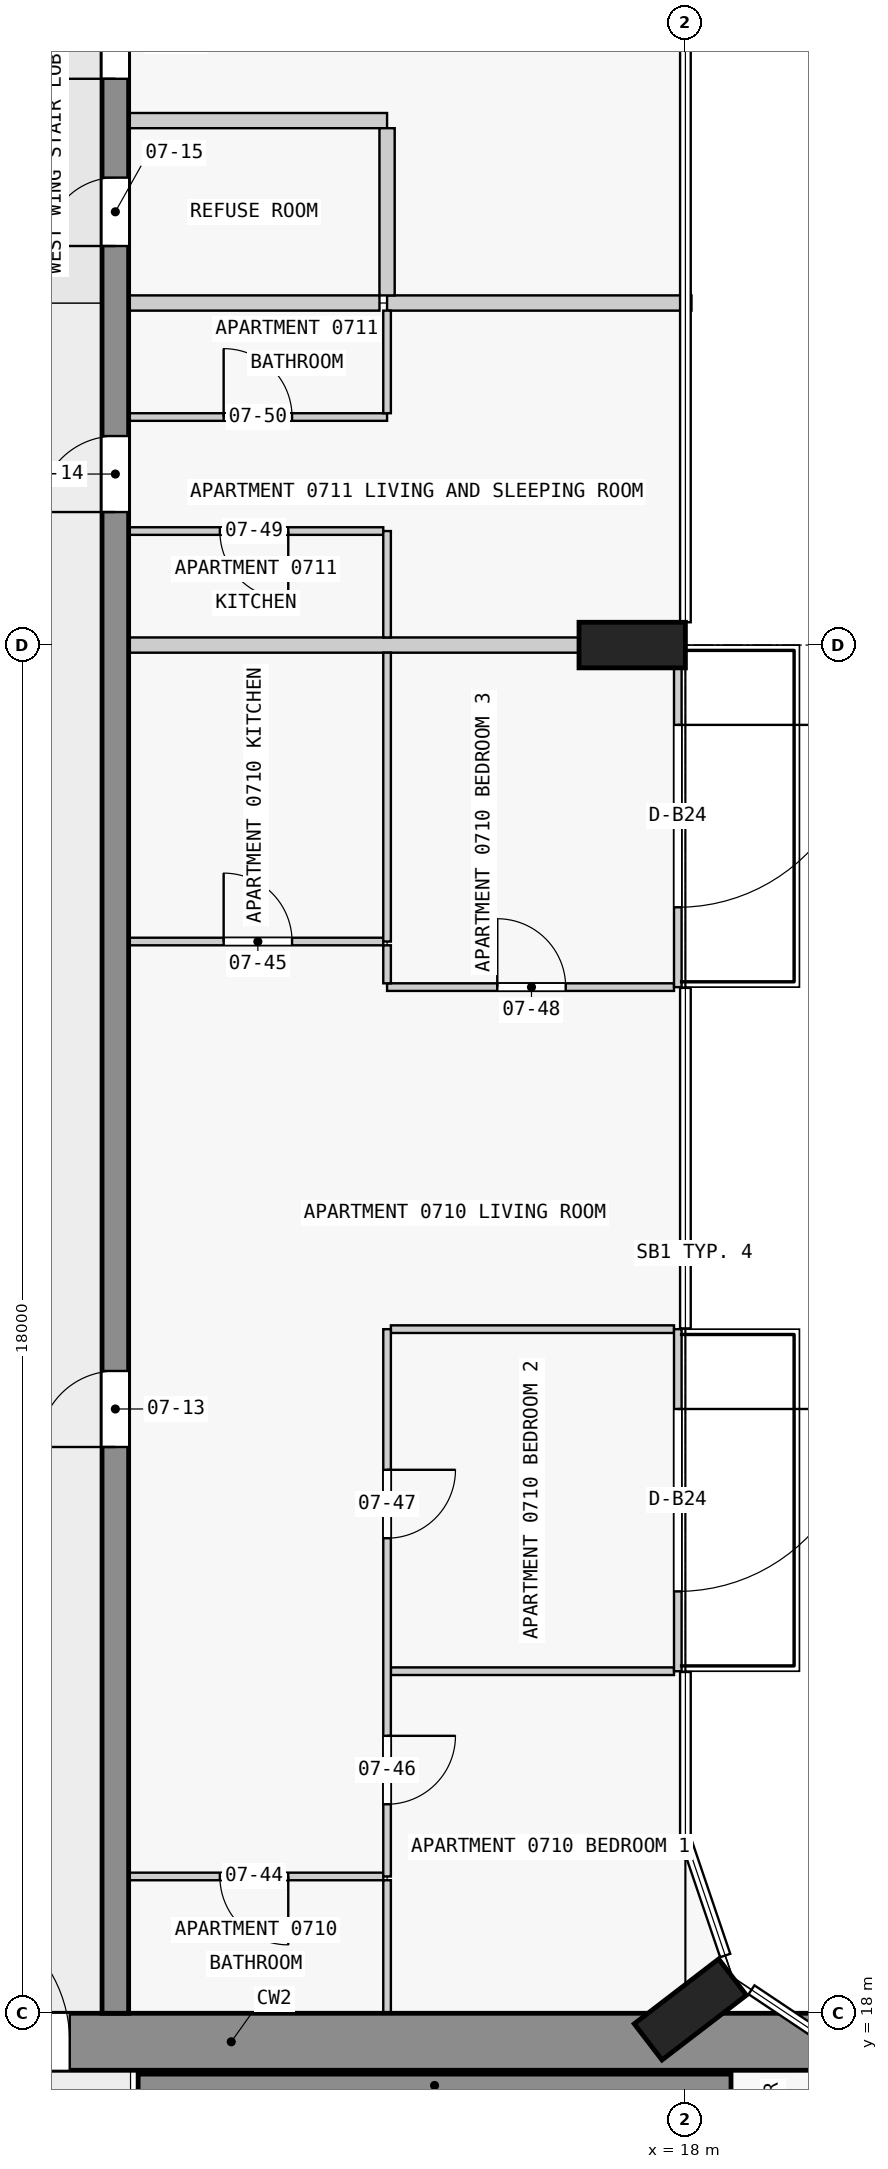
"""IFC4 building model, lengths in metres.
Left out: names, types, materials, properties, quantities, classifications, styles, units other than length and angle.
Written with IfcOpenShell. Run it as: python <this file> out.ifc"""

import sys

from ifc_helpers import new_model, si_unit, direction, frame, frame_2d, origin, origin_2d, place, context, subcontext, project, spatial, rectangle, extrude, element, fill, save


model = new_model("IFC4")
c1 = context("Model", 3, precision=1e-05, world=origin(), true_north=direction((0.0, 1.0)))
c2 = subcontext(c1, "Body", "Model", "MODEL_VIEW")
j1 = project(units=[si_unit("LENGTHUNIT", "METRE"), si_unit("PLANEANGLEUNIT", "RADIAN")], contexts=[c1])
p1 = place(None, origin())
s1 = spatial("IfcSite", under=j1, at=p1, CompositionType="ELEMENT")
p2 = place(p1, origin())
s2 = spatial("IfcBuilding", under=s1, at=p2, CompositionType="ELEMENT")
p3 = place(p2, frame((0.0, 0.0, 33.8)))
s3 = spatial("IfcBuildingStorey", under=s2, at=p3, CompositionType="ELEMENT", Elevation=33.8)
for number, where, z_axis, x_axis in (
    (1, (18.065, 18.05, 0.0), (0.0, 0.0, 1.0), (-0.609, 0.793, 0.0)),
    (2, (17.3, 36.0, 0.0), (0.0, 0.0, 1.0), (0.0, 1.0, 0.0)),
):
    element("IfcColumn", number, at=place(p3, frame(where, z_axis=z_axis, x_axis=x_axis)), inside=s3, PredefinedType="COLUMN", context=c2, shape_type="SweptSolid", body=[
        extrude(rectangle(XDim=0.6, YDim=1.4, at=origin_2d()), origin(), (0.0, 0.0, 1.0), 3.5),
    ])
p4 = place(p3, frame((1.55, 17.625, 0.0), z_axis=(0.0, 0.0, 1.0), x_axis=(1.0, 0.0, 0.0)))
e3 = element("IfcWall", 3, at=p4, inside=s3, PredefinedType="SHEAR", context=c2, shape_type="SweptSolid", body=[
    extrude(rectangle(XDim=20.95, YDim=0.75, at=frame_2d((10.475, 0.0))), origin(), (0.0, 0.0, 1.0), 3.25),
])
p5 = place(p4, frame((6.55, 0.0, 0.0)))
e4 = element("IfcOpeningElement", 4, at=p5, cuts=e3, PredefinedType="OPENING", context=c2, shape_type="SweptSolid", body=[
    extrude(rectangle(XDim=1.8, YDim=2.1, at=frame_2d((0.9, 1.05))), frame((0.0, 0.385, 0.0), z_axis=(0.0, -1.0, 0.0), x_axis=(1.0, 0.0, 0.0)), (0.0, 0.0, 1.0), 0.77),
])
p6 = place(p3, frame((10.8, 17.05, 0.0), z_axis=(0.0, 0.0, 1.0), x_axis=(1.0, 0.0, 0.0)))
e5 = element("IfcWall", 5, at=p6, inside=s3, PredefinedType="SHEAR", context=c2, shape_type="SweptSolid", body=[
    extrude(rectangle(XDim=7.8, YDim=0.3, at=frame_2d((3.9, 0.0))), origin(), (0.0, 0.0, 1.0), 3.25),
])
p7 = place(p3, frame((10.5, 18.0, 0.0), z_axis=(0.0, 0.0, 1.0), x_axis=(0.0, 1.0, 0.0)))
e6 = element("IfcWall", 6, at=p7, inside=s3, PredefinedType="SHEAR", context=c2, shape_type="SweptSolid", body=[
    extrude(rectangle(XDim=27.0, YDim=0.35, at=frame_2d((13.5, 0.0))), origin(), (0.0, 0.0, 1.0), 3.25),
])
p8 = place(p7, frame((7.45, 0.0, 0.0)))
e7 = element("IfcOpeningElement", 7, at=p8, cuts=e6, PredefinedType="OPENING", context=c2, shape_type="SweptSolid", body=[
    extrude(rectangle(XDim=1.0, YDim=2.1, at=frame_2d((0.5, 1.05))), frame((0.0, 0.185, 0.0), z_axis=(0.0, -1.0, 0.0), x_axis=(1.0, 0.0, 0.0)), (0.0, 0.0, 1.0), 0.37),
])
p9 = place(p7, frame((19.75, 0.0, 0.0)))
e8 = element("IfcOpeningElement", 8, at=p9, cuts=e6, PredefinedType="OPENING", context=c2, shape_type="SweptSolid", body=[
    extrude(rectangle(XDim=1.0, YDim=2.1, at=frame_2d((0.5, 1.05))), frame((0.0, 0.185, 0.0), z_axis=(0.0, -1.0, 0.0), x_axis=(1.0, 0.0, 0.0)), (0.0, 0.0, 1.0), 0.37),
])
p10 = place(p7, frame((23.25, 0.0, 0.0)))
e9 = element("IfcOpeningElement", 9, at=p10, cuts=e6, PredefinedType="OPENING", context=c2, shape_type="SweptSolid", body=[
    extrude(rectangle(XDim=0.9, YDim=2.1, at=frame_2d((0.45, 1.05))), frame((0.0, 0.185, 0.0), z_axis=(0.0, -1.0, 0.0), x_axis=(1.0, 0.0, 0.0)), (0.0, 0.0, 1.0), 0.37),
])
p11 = place(p7, frame((25.45, 0.0, 0.0)))
e10 = element("IfcOpeningElement", 10, at=p11, cuts=e6, PredefinedType="OPENING", context=c2, shape_type="SweptSolid", body=[
    extrude(rectangle(XDim=1.0, YDim=2.1, at=frame_2d((0.5, 1.05))), frame((0.0, 0.185, 0.0), z_axis=(0.0, -1.0, 0.0), x_axis=(1.0, 0.0, 0.0)), (0.0, 0.0, 1.0), 0.37),
])
p12 = place(p3, frame((17.9, 27.0, 0.0), z_axis=(0.0, 0.0, 1.0), x_axis=(0.0, -1.0, 0.0)))
e11 = element("IfcWall", 11, at=p12, inside=s3, PredefinedType="STANDARD", context=c2, shape_type="SweptSolid", body=[
    extrude(rectangle(XDim=4.5, YDim=0.1, at=frame_2d((2.25, 0.0))), origin(), (0.0, 0.0, 1.0), 3.25),
])
p13 = place(p12, frame((1.05, 0.0, 0.0)))
e12 = element("IfcOpeningElement", 12, at=p13, cuts=e11, PredefinedType="OPENING", context=c2, shape_type="SweptSolid", body=[
    extrude(rectangle(XDim=2.4, YDim=2.4, at=frame_2d((1.2, 1.2))), frame((0.0, 0.06, 0.0), z_axis=(0.0, -1.0, 0.0), x_axis=(1.0, 0.0, 0.0)), (0.0, 0.0, 1.0), 0.12),
])
p14 = place(p3, frame((17.9, 36.0, 0.0), z_axis=(0.0, 0.0, 1.0), x_axis=(0.0, -1.0, 0.0)))
e13 = element("IfcWall", 13, at=p14, inside=s3, PredefinedType="STANDARD", context=c2, shape_type="SweptSolid", body=[
    extrude(rectangle(XDim=4.5, YDim=0.1, at=frame_2d((2.25, 0.0))), origin(), (0.0, 0.0, 1.0), 3.25),
])
p15 = place(p14, frame((1.05, 0.0, 0.0)))
e14 = element("IfcOpeningElement", 14, at=p15, cuts=e13, PredefinedType="OPENING", context=c2, shape_type="SweptSolid", body=[
    extrude(rectangle(XDim=2.4, YDim=2.4, at=frame_2d((1.2, 1.2))), frame((0.0, 0.06, 0.0), z_axis=(0.0, -1.0, 0.0), x_axis=(1.0, 0.0, 0.0)), (0.0, 0.0, 1.0), 0.12),
])
p16 = place(p3, frame((14.025, 19.8, 0.0), z_axis=(0.0, 0.0, 1.0), x_axis=(-1.0, 0.0, 0.0)))
e15 = element("IfcWall", 15, at=p16, inside=s3, PredefinedType="PARTITIONING", context=c2, shape_type="SweptSolid", body=[
    extrude(rectangle(XDim=3.35, YDim=0.1, at=frame_2d((1.675, 0.0))), origin(), (0.0, 0.0, 1.0), 3.25),
])
p17 = place(p16, frame((1.25, 0.0, 0.0)))
e16 = element("IfcOpeningElement", 16, at=p17, cuts=e15, PredefinedType="OPENING", context=c2, shape_type="SweptSolid", body=[
    extrude(rectangle(XDim=0.9, YDim=2.1, at=frame_2d((0.45, 1.05))), frame((0.0, 0.06, 0.0), z_axis=(0.0, -1.0, 0.0), x_axis=(1.0, 0.0, 0.0)), (0.0, 0.0, 1.0), 0.12),
])
for number, where, z_axis, x_axis in (
    (17, (17.85, 22.5, 0.0), (0.0, 0.0, 1.0), (-1.0, 0.0, 0.0)),
    (18, (17.85, 27.0, 0.0), (0.0, 0.0, 1.0), (-1.0, 0.0, 0.0)),
):
    element("IfcWall", number, at=place(p3, frame(where, z_axis=z_axis, x_axis=x_axis)), inside=s3, PredefinedType="PARTITIONING", context=c2, shape_type="SweptSolid", body=[
        extrude(rectangle(XDim=3.725, YDim=0.1, at=frame_2d((1.863, 0.0))), origin(), (0.0, 0.0, 1.0), 3.25),
    ])
p18 = place(p3, frame((14.075, 31.5, 0.0), z_axis=(0.0, 0.0, 1.0), x_axis=(1.0, 0.0, 0.0)))
e19 = element("IfcWall", 19, at=p18, inside=s3, PredefinedType="PARTITIONING", context=c2, shape_type="SweptSolid", body=[
    extrude(rectangle(XDim=3.775, YDim=0.1, at=frame_2d((1.888, 0.0))), origin(), (0.0, 0.0, 1.0), 3.25),
])
p19 = place(p18, frame((1.45, 0.0, 0.0)))
e20 = element("IfcOpeningElement", 20, at=p19, cuts=e19, PredefinedType="OPENING", context=c2, shape_type="SweptSolid", body=[
    extrude(rectangle(XDim=0.9, YDim=2.1, at=frame_2d((0.45, 1.05))), frame((0.0, 0.06, 0.0), z_axis=(0.0, -1.0, 0.0), x_axis=(1.0, 0.0, 0.0)), (0.0, 0.0, 1.0), 0.12),
])
p20 = place(p3, frame((10.675, 32.1, 0.0), z_axis=(0.0, 0.0, 1.0), x_axis=(1.0, 0.0, 0.0)))
e21 = element("IfcWall", 21, at=p20, inside=s3, PredefinedType="PARTITIONING", context=c2, shape_type="SweptSolid", body=[
    extrude(rectangle(XDim=3.35, YDim=0.1, at=frame_2d((1.675, 0.0))), origin(), (0.0, 0.0, 1.0), 3.25),
])
p21 = place(p20, frame((1.25, 0.0, 0.0)))
e22 = element("IfcOpeningElement", 22, at=p21, cuts=e21, PredefinedType="OPENING", context=c2, shape_type="SweptSolid", body=[
    extrude(rectangle(XDim=0.9, YDim=2.1, at=frame_2d((0.45, 1.05))), frame((0.0, 0.06, 0.0), z_axis=(0.0, -1.0, 0.0), x_axis=(1.0, 0.0, 0.0)), (0.0, 0.0, 1.0), 0.12),
])
p22 = place(p3, frame((16.6, 36.0, 0.0), z_axis=(0.0, 0.0, 1.0), x_axis=(-1.0, 0.0, 0.0)))
e23 = element("IfcWall", 23, at=p22, inside=s3, PredefinedType="PARTITIONING", context=c2, shape_type="SweptSolid", body=[
    extrude(rectangle(XDim=5.925, YDim=0.2, at=frame_2d((2.962, 0.0))), origin(), (0.0, 0.0, 1.0), 3.25),
])
p23 = place(p3, frame((14.025, 37.5, 0.0), z_axis=(0.0, 0.0, 1.0), x_axis=(-1.0, 0.0, 0.0)))
e24 = element("IfcWall", 24, at=p23, inside=s3, PredefinedType="PARTITIONING", context=c2, shape_type="SweptSolid", body=[
    extrude(rectangle(XDim=3.35, YDim=0.1, at=frame_2d((1.675, 0.0))), origin(), (0.0, 0.0, 1.0), 3.25),
])
p24 = place(p23, frame((1.25, 0.0, 0.0)))
e25 = element("IfcOpeningElement", 25, at=p24, cuts=e24, PredefinedType="OPENING", context=c2, shape_type="SweptSolid", body=[
    extrude(rectangle(XDim=0.9, YDim=2.1, at=frame_2d((0.45, 1.05))), frame((0.0, 0.06, 0.0), z_axis=(0.0, -1.0, 0.0), x_axis=(1.0, 0.0, 0.0)), (0.0, 0.0, 1.0), 0.12),
])
p25 = place(p3, frame((10.675, 39.0, 0.0), z_axis=(0.0, 0.0, 1.0), x_axis=(1.0, 0.0, 0.0)))
e26 = element("IfcWall", 26, at=p25, inside=s3, PredefinedType="PARTITIONING", context=c2, shape_type="SweptSolid", body=[
    extrude(rectangle(XDim=3.4, YDim=0.1, at=frame_2d((1.7, 0.0))), origin(), (0.0, 0.0, 1.0), 3.25),
])
p26 = place(p25, frame((1.25, 0.0, 0.0)))
e27 = element("IfcOpeningElement", 27, at=p26, cuts=e26, PredefinedType="OPENING", context=c2, shape_type="SweptSolid", body=[
    extrude(rectangle(XDim=0.9, YDim=2.1, at=frame_2d((0.45, 1.05))), frame((0.0, 0.06, 0.0), z_axis=(0.0, -1.0, 0.0), x_axis=(1.0, 0.0, 0.0)), (0.0, 0.0, 1.0), 0.12),
])
p27 = place(p3, frame((13.975, 40.5, 0.0), z_axis=(0.0, 0.0, 1.0), x_axis=(-1.0, 0.0, 0.0)))
e28 = element("IfcWall", 28, at=p27, inside=s3, PredefinedType="PARTITIONING", context=c2, shape_type="SweptSolid", body=[
    extrude(rectangle(XDim=3.3, YDim=0.2, at=frame_2d((1.65, 0.0))), origin(), (0.0, 0.0, 1.0), 3.25),
])
p28 = place(p3, frame((14.075, 40.5, 0.0), z_axis=(0.0, 0.0, 1.0), x_axis=(1.0, 0.0, 0.0)))
e29 = element("IfcWall", 29, at=p28, inside=s3, PredefinedType="PARTITIONING", context=c2, shape_type="SweptSolid", body=[
    extrude(rectangle(XDim=4.005, YDim=0.2, at=frame_2d((2.002, 0.0))), origin(), (0.0, 0.0, 1.0), 3.25),
])
p29 = place(p3, frame((14.075, 42.9, 0.0), z_axis=(0.0, 0.0, 1.0), x_axis=(-1.0, 0.0, 0.0)))
e30 = element("IfcWall", 30, at=p29, inside=s3, PredefinedType="PARTITIONING", context=c2, shape_type="SweptSolid", body=[
    extrude(rectangle(XDim=3.4, YDim=0.2, at=frame_2d((1.7, 0.0))), origin(), (0.0, 0.0, 1.0), 3.25),
])
p30 = place(p3, frame((14.075, 27.0, 0.0), z_axis=(0.0, 0.0, 1.0), x_axis=(0.0, -1.0, 0.0)))
e31 = element("IfcWall", 31, at=p30, inside=s3, PredefinedType="PARTITIONING", context=c2, shape_type="SweptSolid", body=[
    extrude(rectangle(XDim=7.2, YDim=0.1, at=frame_2d((3.6, 0.0))), origin(), (0.0, 0.0, 1.0), 3.25),
])
p31 = place(p30, frame((5.35, 0.0, 0.0)))
e32 = element("IfcOpeningElement", 32, at=p31, cuts=e31, PredefinedType="OPENING", context=c2, shape_type="SweptSolid", body=[
    extrude(rectangle(XDim=0.9, YDim=2.1, at=frame_2d((0.45, 1.05))), frame((0.0, 0.06, 0.0), z_axis=(0.0, -1.0, 0.0), x_axis=(1.0, 0.0, 0.0)), (0.0, 0.0, 1.0), 0.12),
])
p32 = place(p30, frame((1.85, 0.0, 0.0)))
e33 = element("IfcOpeningElement", 33, at=p32, cuts=e31, PredefinedType="OPENING", context=c2, shape_type="SweptSolid", body=[
    extrude(rectangle(XDim=0.9, YDim=2.1, at=frame_2d((0.45, 1.05))), frame((0.0, 0.06, 0.0), z_axis=(0.0, -1.0, 0.0), x_axis=(1.0, 0.0, 0.0)), (0.0, 0.0, 1.0), 0.12),
])
p33 = place(p3, frame((14.075, 32.05, 0.0), z_axis=(0.0, 0.0, 1.0), x_axis=(0.0, -1.0, 0.0)))
e34 = element("IfcWall", 34, at=p33, inside=s3, PredefinedType="PARTITIONING", context=c2, shape_type="SweptSolid", body=[
    extrude(rectangle(XDim=0.5, YDim=0.1, at=frame_2d((0.25, 0.0))), origin(), (0.0, 0.0, 1.0), 3.25),
])
p34 = place(p3, frame((14.075, 18.0, 0.0), z_axis=(0.0, 0.0, 1.0), x_axis=(0.0, 1.0, 0.0)))
e35 = element("IfcWall", 35, at=p34, inside=s3, PredefinedType="PARTITIONING", context=c2, shape_type="SweptSolid", body=[
    extrude(rectangle(XDim=1.75, YDim=0.1, at=frame_2d((0.875, 0.0))), origin(), (0.0, 0.0, 1.0), 3.25),
])
p35 = place(p3, frame((14.075, 32.1, 0.0), z_axis=(0.0, 0.0, 1.0), x_axis=(0.0, 1.0, 0.0)))
e36 = element("IfcWall", 36, at=p35, inside=s3, PredefinedType="PARTITIONING", context=c2, shape_type="SweptSolid", body=[
    extrude(rectangle(XDim=3.8, YDim=0.1, at=frame_2d((1.9, 0.0))), origin(), (0.0, 0.0, 1.0), 3.25),
])
p36 = place(p3, frame((14.075, 36.1, 0.0), z_axis=(0.0, 0.0, 1.0), x_axis=(0.0, 1.0, 0.0)))
e37 = element("IfcWall", 37, at=p36, inside=s3, PredefinedType="PARTITIONING", context=c2, shape_type="SweptSolid", body=[
    extrude(rectangle(XDim=1.4, YDim=0.1, at=frame_2d((0.7, 0.0))), origin(), (0.0, 0.0, 1.0), 3.25),
])
p37 = place(p3, frame((14.075, 39.05, 0.0), z_axis=(0.0, 0.0, 1.0), x_axis=(0.0, 1.0, 0.0)))
e38 = element("IfcWall", 38, at=p37, inside=s3, PredefinedType="PARTITIONING", context=c2, shape_type="SweptSolid", body=[
    extrude(rectangle(XDim=1.35, YDim=0.1, at=frame_2d((0.675, 0.0))), origin(), (0.0, 0.0, 1.0), 3.25),
])
p38 = place(p3, frame((14.075, 40.6, 0.0), z_axis=(0.0, 0.0, 1.0), x_axis=(0.0, 1.0, 0.0)))
e39 = element("IfcWall", 39, at=p38, inside=s3, PredefinedType="PARTITIONING", context=c2, shape_type="SweptSolid", body=[
    extrude(rectangle(XDim=2.2, YDim=0.2, at=frame_2d((1.1, 0.0))), origin(), (0.0, 0.0, 1.0), 3.25),
])
p39 = place(p13, origin())
e40 = element("IfcDoor", 40, at=p39, inside=s3, OperationType="SINGLE_SWING_LEFT", PredefinedType="DOOR", context=c2, shape_type="SweptSolid", body=[
    extrude(rectangle(XDim=2.4, YDim=2.4, at=frame_2d((1.2, 1.2))), frame((0.0, 0.025, 0.0), z_axis=(0.0, -1.0, 0.0), x_axis=(1.0, 0.0, 0.0)), (0.0, 0.0, 1.0), 0.05),
])
fill(e12, e40)
p40 = place(p15, origin())
e41 = element("IfcDoor", 41, at=p40, inside=s3, OperationType="SINGLE_SWING_LEFT", PredefinedType="DOOR", context=c2, shape_type="SweptSolid", body=[
    extrude(rectangle(XDim=2.4, YDim=2.4, at=frame_2d((1.2, 1.2))), frame((0.0, 0.025, 0.0), z_axis=(0.0, -1.0, 0.0), x_axis=(1.0, 0.0, 0.0)), (0.0, 0.0, 1.0), 0.05),
])
fill(e14, e41)
p41 = place(p5, origin())
e42 = element("IfcDoor", 42, at=p41, inside=s3, OperationType="DOUBLE_DOOR_SINGLE_SWING", PredefinedType="DOOR", context=c2, shape_type="SweptSolid", body=[
    extrude(rectangle(XDim=1.8, YDim=2.1, at=frame_2d((0.9, 1.05))), frame((0.0, 0.025, 0.0), z_axis=(0.0, -1.0, 0.0), x_axis=(1.0, 0.0, 0.0)), (0.0, 0.0, 1.0), 0.05),
])
fill(e4, e42)
p42 = place(p8, origin())
e43 = element("IfcDoor", 43, at=p42, inside=s3, OperationType="SINGLE_SWING_LEFT", PredefinedType="DOOR", context=c2, shape_type="SweptSolid", body=[
    extrude(rectangle(XDim=1.0, YDim=2.1, at=frame_2d((0.5, 1.05))), frame((0.0, 0.025, 0.0), z_axis=(0.0, -1.0, 0.0), x_axis=(1.0, 0.0, 0.0)), (0.0, 0.0, 1.0), 0.05),
])
fill(e7, e43)
p43 = place(p9, origin())
e44 = element("IfcDoor", 44, at=p43, inside=s3, OperationType="SINGLE_SWING_RIGHT", PredefinedType="DOOR", context=c2, shape_type="SweptSolid", body=[
    extrude(rectangle(XDim=1.0, YDim=2.1, at=frame_2d((0.5, 1.05))), frame((0.0, 0.025, 0.0), z_axis=(0.0, -1.0, 0.0), x_axis=(1.0, 0.0, 0.0)), (0.0, 0.0, 1.0), 0.05),
])
fill(e8, e44)
p44 = place(p10, origin())
e45 = element("IfcDoor", 45, at=p44, inside=s3, OperationType="SINGLE_SWING_RIGHT", PredefinedType="DOOR", context=c2, shape_type="SweptSolid", body=[
    extrude(rectangle(XDim=0.9, YDim=2.1, at=frame_2d((0.45, 1.05))), frame((0.0, 0.025, 0.0), z_axis=(0.0, -1.0, 0.0), x_axis=(1.0, 0.0, 0.0)), (0.0, 0.0, 1.0), 0.05),
])
fill(e9, e45)
p45 = place(p11, origin())
e46 = element("IfcDoor", 46, at=p45, inside=s3, OperationType="SINGLE_SWING_RIGHT", PredefinedType="DOOR", context=c2, shape_type="SweptSolid", body=[
    extrude(rectangle(XDim=1.0, YDim=2.1, at=frame_2d((0.5, 1.05))), frame((0.0, 0.025, 0.0), z_axis=(0.0, -1.0, 0.0), x_axis=(1.0, 0.0, 0.0)), (0.0, 0.0, 1.0), 0.05),
])
fill(e10, e46)
p46 = place(p17, origin())
e47 = element("IfcDoor", 47, at=p46, inside=s3, OperationType="SINGLE_SWING_RIGHT", PredefinedType="DOOR", context=c2, shape_type="SweptSolid", body=[
    extrude(rectangle(XDim=0.9, YDim=2.1, at=frame_2d((0.45, 1.05))), frame((0.0, 0.025, 0.0), z_axis=(0.0, -1.0, 0.0), x_axis=(1.0, 0.0, 0.0)), (0.0, 0.0, 1.0), 0.05),
])
fill(e16, e47)
p47 = place(p21, origin())
e48 = element("IfcDoor", 48, at=p47, inside=s3, OperationType="SINGLE_SWING_RIGHT", PredefinedType="DOOR", context=c2, shape_type="SweptSolid", body=[
    extrude(rectangle(XDim=0.9, YDim=2.1, at=frame_2d((0.45, 1.05))), frame((0.0, 0.025, 0.0), z_axis=(0.0, -1.0, 0.0), x_axis=(1.0, 0.0, 0.0)), (0.0, 0.0, 1.0), 0.05),
])
fill(e22, e48)
p48 = place(p31, origin())
e49 = element("IfcDoor", 49, at=p48, inside=s3, OperationType="SINGLE_SWING_RIGHT", PredefinedType="DOOR", context=c2, shape_type="SweptSolid", body=[
    extrude(rectangle(XDim=0.9, YDim=2.1, at=frame_2d((0.45, 1.05))), frame((0.0, 0.025, 0.0), z_axis=(0.0, -1.0, 0.0), x_axis=(1.0, 0.0, 0.0)), (0.0, 0.0, 1.0), 0.05),
])
fill(e32, e49)
p49 = place(p32, origin())
e50 = element("IfcDoor", 50, at=p49, inside=s3, OperationType="SINGLE_SWING_LEFT", PredefinedType="DOOR", context=c2, shape_type="SweptSolid", body=[
    extrude(rectangle(XDim=0.9, YDim=2.1, at=frame_2d((0.45, 1.05))), frame((0.0, 0.025, 0.0), z_axis=(0.0, -1.0, 0.0), x_axis=(1.0, 0.0, 0.0)), (0.0, 0.0, 1.0), 0.05),
])
fill(e33, e50)
p50 = place(p19, origin())
e51 = element("IfcDoor", 51, at=p50, inside=s3, OperationType="SINGLE_SWING_RIGHT", PredefinedType="DOOR", context=c2, shape_type="SweptSolid", body=[
    extrude(rectangle(XDim=0.9, YDim=2.1, at=frame_2d((0.45, 1.05))), frame((0.0, 0.025, 0.0), z_axis=(0.0, -1.0, 0.0), x_axis=(1.0, 0.0, 0.0)), (0.0, 0.0, 1.0), 0.05),
])
fill(e20, e51)
p51 = place(p24, origin())
e52 = element("IfcDoor", 52, at=p51, inside=s3, OperationType="SINGLE_SWING_RIGHT", PredefinedType="DOOR", context=c2, shape_type="SweptSolid", body=[
    extrude(rectangle(XDim=0.9, YDim=2.1, at=frame_2d((0.45, 1.05))), frame((0.0, 0.025, 0.0), z_axis=(0.0, -1.0, 0.0), x_axis=(1.0, 0.0, 0.0)), (0.0, 0.0, 1.0), 0.05),
])
fill(e25, e52)
p52 = place(p26, origin())
e53 = element("IfcDoor", 53, at=p52, inside=s3, OperationType="SINGLE_SWING_RIGHT", PredefinedType="DOOR", context=c2, shape_type="SweptSolid", body=[
    extrude(rectangle(XDim=0.9, YDim=2.1, at=frame_2d((0.45, 1.05))), frame((0.0, 0.025, 0.0), z_axis=(0.0, -1.0, 0.0), x_axis=(1.0, 0.0, 0.0)), (0.0, 0.0, 1.0), 0.05),
])
fill(e27, e53)
save(model, sys.argv[1])
